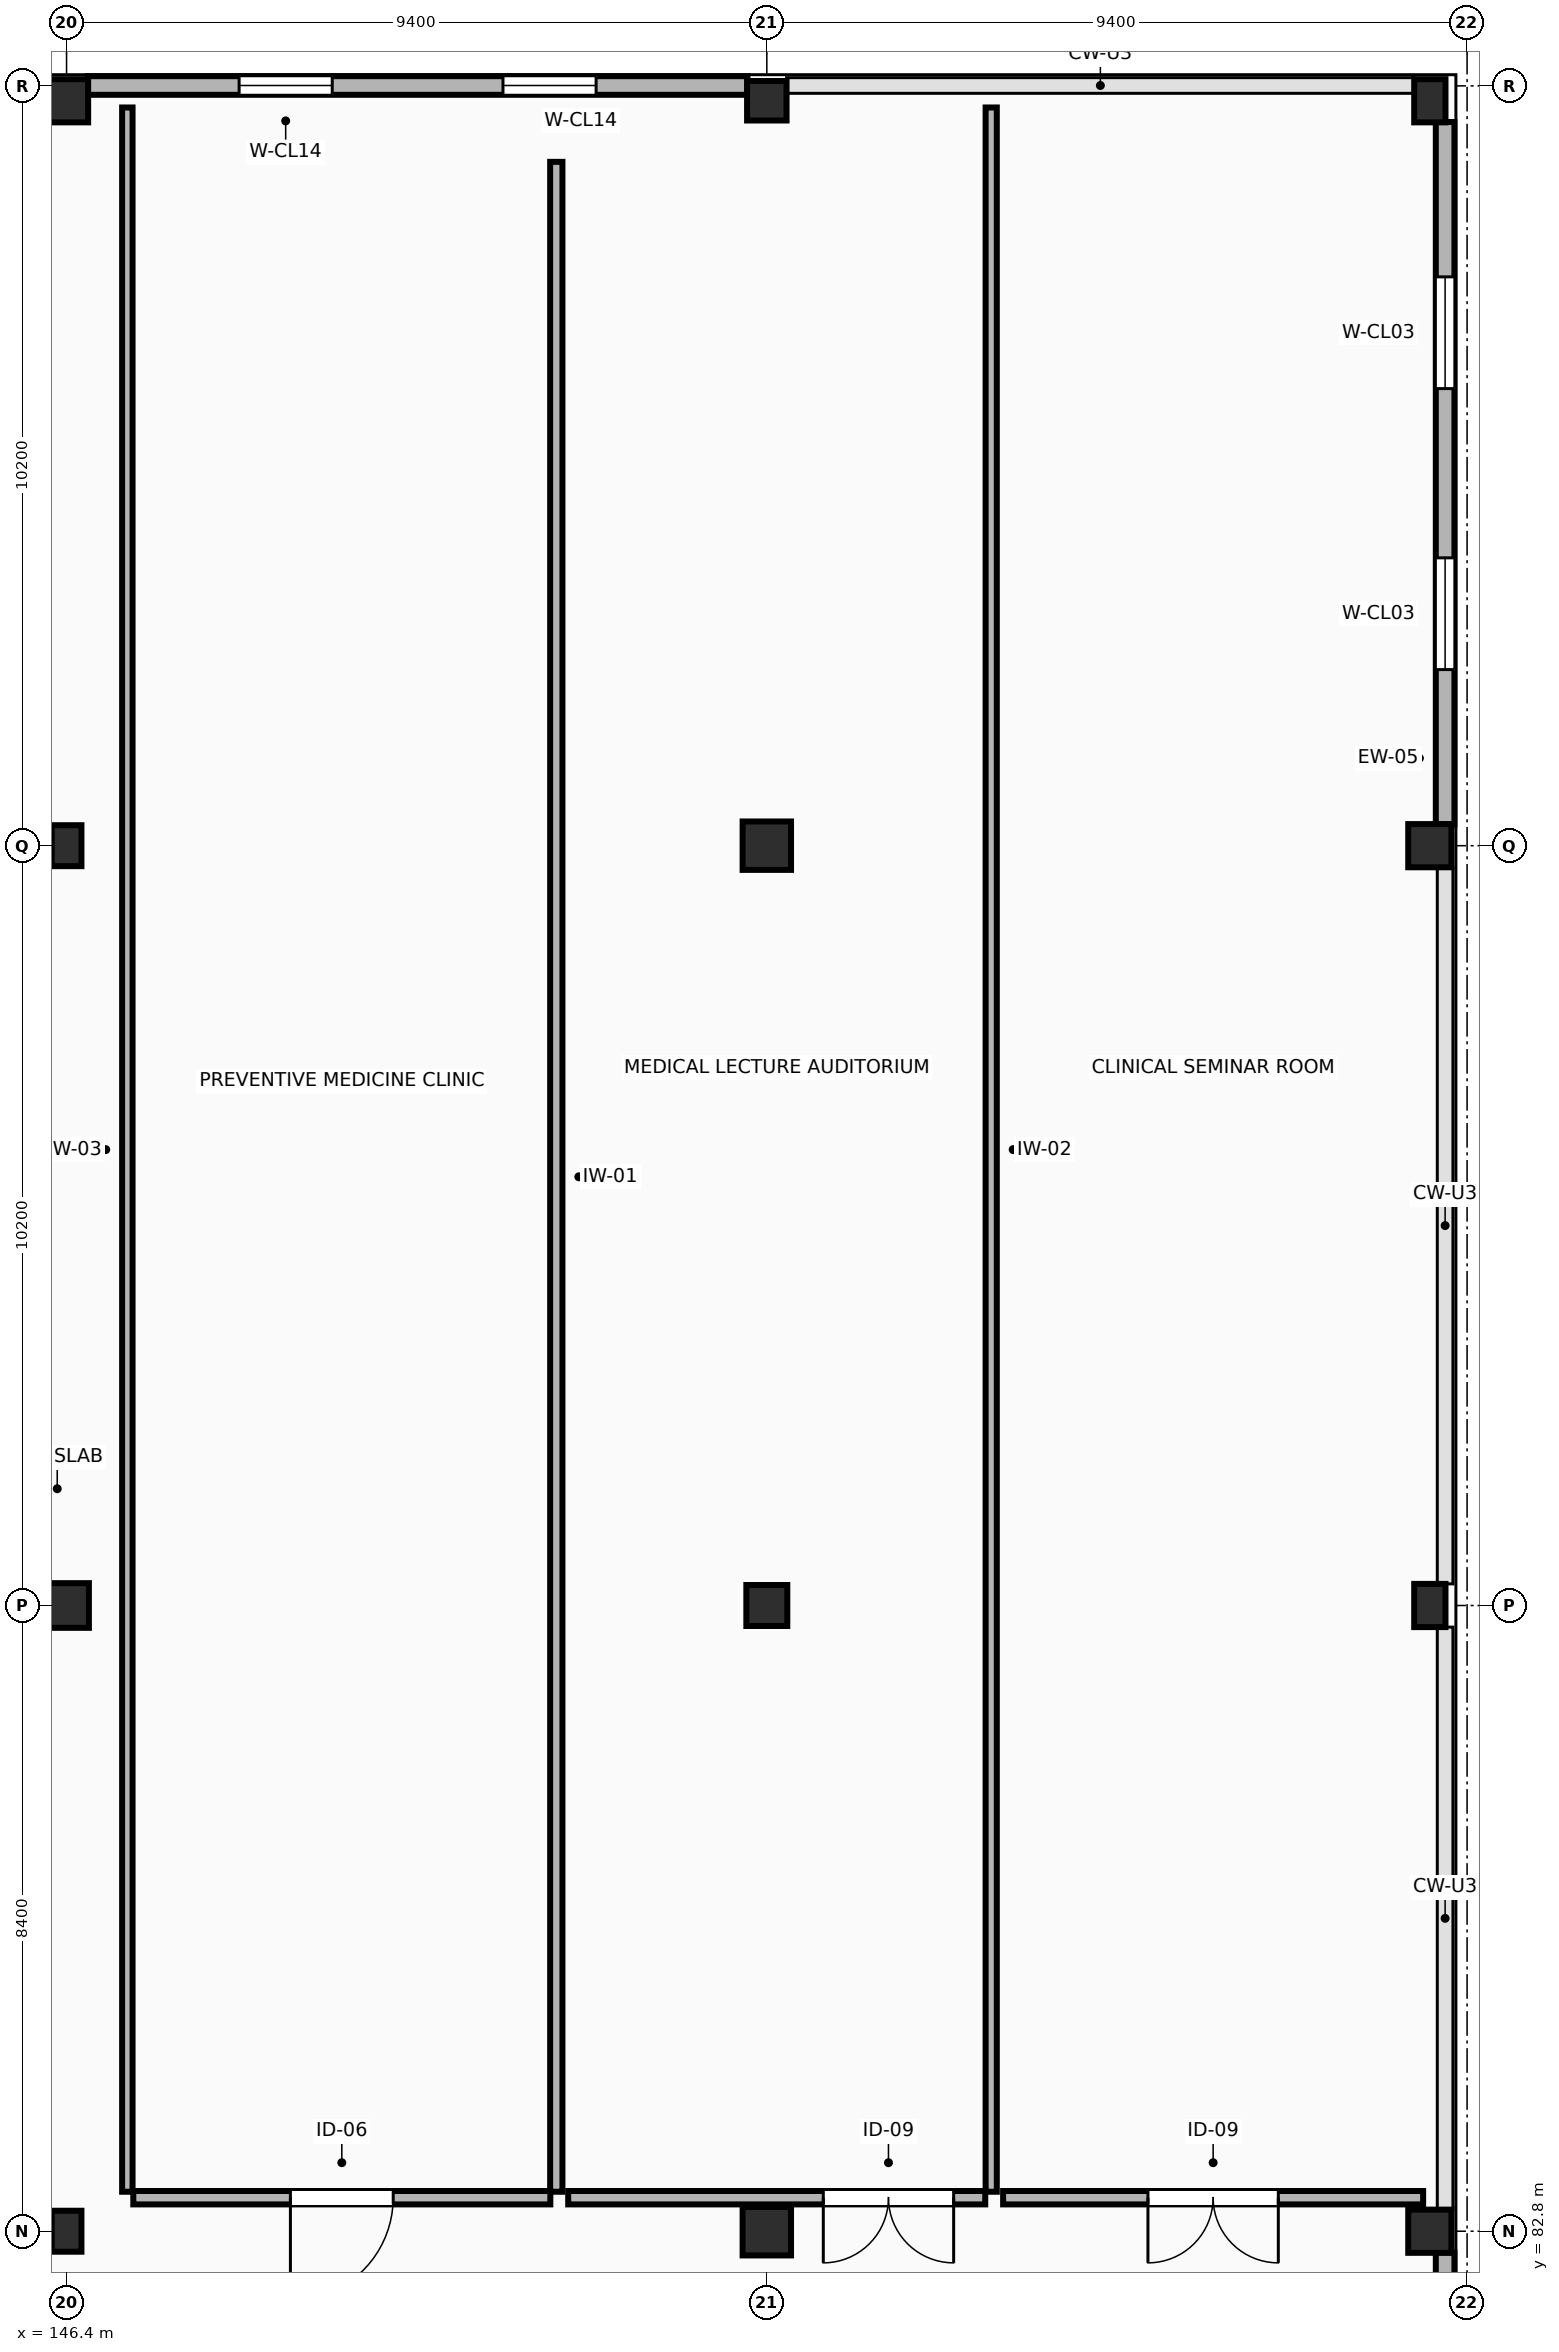
"""IFC4 building model, lengths in metres.
Left out: names, types, materials, properties, quantities, classifications, styles, units other than length and angle.
Written with IfcOpenShell. Run it as: python <this file> out.ifc"""

import sys

from ifc_helpers import new_model, si_unit, direction, frame, frame_2d, origin, origin_2d, place, context, subcontext, project, spatial, rectangle, extrude, element, fill, save


model = new_model("IFC4")
c1 = context("Model", 3, precision=1e-05, world=origin(), true_north=direction((0.0, 1.0)))
c2 = subcontext(c1, "Body", "Model", "MODEL_VIEW")
j1 = project(units=[si_unit("LENGTHUNIT", "METRE"), si_unit("PLANEANGLEUNIT", "RADIAN")], contexts=[c1])
p1 = place(None, origin())
s1 = spatial("IfcSite", under=j1, at=p1, CompositionType="ELEMENT")
p2 = place(p1, origin())
s2 = spatial("IfcBuilding", under=s1, at=p2, CompositionType="ELEMENT")
p3 = place(p2, origin())
s3 = spatial("IfcBuildingStorey", under=s2, at=p3, CompositionType="ELEMENT", Elevation=0.0)
p4 = place(p3, frame((146.4, 82.8, -1.75), z_axis=(0.0, 0.0, 1.0), x_axis=(1.0, 0.0, 0.0)))
e1 = element("IfcColumn", 1, at=p4, inside=s3, PredefinedType="COLUMN", context=c2, shape_type="SweptSolid", body=[
    extrude(rectangle(XDim=0.4, YDim=0.55, at=origin_2d()), origin(), (0.0, 0.0, 1.0), 7.15),
])
p5 = place(p3, frame((146.4, 91.2, -1.75), z_axis=(0.0, 0.0, 1.0), x_axis=(1.0, 0.0, 0.0)))
e2 = element("IfcColumn", 2, at=p5, inside=s3, PredefinedType="COLUMN", context=c2, shape_type="SweptSolid", body=[
    extrude(rectangle(XDim=0.6, YDim=0.6, at=origin_2d()), origin(), (0.0, 0.0, 1.0), 7.15),
])
p6 = place(p3, frame((146.4, 101.4, -1.75), z_axis=(0.0, 0.0, 1.0), x_axis=(1.0, 0.0, 0.0)))
e3 = element("IfcColumn", 3, at=p6, inside=s3, PredefinedType="COLUMN", context=c2, shape_type="SweptSolid", body=[
    extrude(rectangle(XDim=0.4, YDim=0.55, at=origin_2d()), origin(), (0.0, 0.0, 1.0), 7.15),
])
p7 = place(p3, frame((146.4, 111.4, -1.75), z_axis=(0.0, 0.0, 1.0), x_axis=(1.0, 0.0, 0.0)))
e4 = element("IfcColumn", 4, at=p7, inside=s3, PredefinedType="COLUMN", context=c2, shape_type="SweptSolid", body=[
    extrude(rectangle(XDim=0.58, YDim=0.58, at=origin_2d()), origin(), (0.0, 0.0, 1.0), 7.15),
])
p8 = place(p3, frame((155.8, 82.8, -1.75), z_axis=(0.0, 0.0, 1.0), x_axis=(1.0, 0.0, 0.0)))
e5 = element("IfcColumn", 5, at=p8, inside=s3, PredefinedType="COLUMN", context=c2, shape_type="SweptSolid", body=[
    extrude(rectangle(XDim=0.65, YDim=0.65, at=origin_2d()), origin(), (0.0, 0.0, 1.0), 7.15),
])
p9 = place(p3, frame((155.8, 91.2, -1.75), z_axis=(0.0, 0.0, 1.0), x_axis=(1.0, 0.0, 0.0)))
e6 = element("IfcColumn", 6, at=p9, inside=s3, PredefinedType="COLUMN", context=c2, shape_type="SweptSolid", body=[
    extrude(rectangle(XDim=0.55, YDim=0.55, at=origin_2d()), origin(), (0.0, 0.0, 1.0), 7.15),
])
p10 = place(p3, frame((155.8, 101.4, -1.75), z_axis=(0.0, 0.0, 1.0), x_axis=(1.0, 0.0, 0.0)))
e7 = element("IfcColumn", 7, at=p10, inside=s3, PredefinedType="COLUMN", context=c2, shape_type="SweptSolid", body=[
    extrude(rectangle(XDim=0.65, YDim=0.65, at=origin_2d()), origin(), (0.0, 0.0, 1.0), 7.15),
])
p11 = place(p3, frame((155.8, 111.4, -1.75), z_axis=(0.0, 0.0, 1.0), x_axis=(1.0, 0.0, 0.0)))
e8 = element("IfcColumn", 8, at=p11, inside=s3, PredefinedType="COLUMN", context=c2, shape_type="SweptSolid", body=[
    extrude(rectangle(XDim=0.53, YDim=0.53, at=origin_2d()), origin(), (0.0, 0.0, 1.0), 7.15),
])
p12 = place(p3, frame((164.7, 82.8, -1.75), z_axis=(0.0, 0.0, 1.0), x_axis=(1.0, 0.0, 0.0)))
e9 = element("IfcColumn", 9, at=p12, inside=s3, PredefinedType="COLUMN", context=c2, shape_type="SweptSolid", body=[
    extrude(rectangle(XDim=0.58, YDim=0.58, at=origin_2d()), origin(), (0.0, 0.0, 1.0), 7.15),
])
p13 = place(p3, frame((164.7, 91.2, -1.75), z_axis=(0.0, 0.0, 1.0), x_axis=(1.0, 0.0, 0.0)))
e10 = element("IfcColumn", 10, at=p13, inside=s3, PredefinedType="COLUMN", context=c2, shape_type="SweptSolid", body=[
    extrude(rectangle(XDim=0.42, YDim=0.58, at=origin_2d()), origin(), (0.0, 0.0, 1.0), 7.15),
])
p14 = place(p3, frame((164.7, 101.4, -1.75), z_axis=(0.0, 0.0, 1.0), x_axis=(1.0, 0.0, 0.0)))
e11 = element("IfcColumn", 11, at=p14, inside=s3, PredefinedType="COLUMN", context=c2, shape_type="SweptSolid", body=[
    extrude(rectangle(XDim=0.58, YDim=0.58, at=origin_2d()), origin(), (0.0, 0.0, 1.0), 7.15),
])
p15 = place(p3, frame((164.7, 111.4, -1.75), z_axis=(0.0, 0.0, 1.0), x_axis=(1.0, 0.0, 0.0)))
e12 = element("IfcColumn", 12, at=p15, inside=s3, PredefinedType="COLUMN", context=c2, shape_type="SweptSolid", body=[
    extrude(rectangle(XDim=0.42, YDim=0.58, at=origin_2d()), origin(), (0.0, 0.0, 1.0), 7.15),
])
p16 = place(p3, frame((164.905, 73.485, 0.0), z_axis=(0.0, 0.0, 1.0), x_axis=(0.0, 1.0, 0.0)))
e13 = element("IfcWall", 13, at=p16, inside=s3, PredefinedType="STANDARD", context=c2, shape_type="SweptSolid", body=[
    extrude(rectangle(XDim=9.03, YDim=0.25, at=frame_2d((4.515, 0.0))), origin(), (0.0, 0.0, 1.0), 4.47),
])
p17 = place(p16, frame((6.575, 0.0, 0.0)))
e14 = element("IfcOpeningElement", 14, at=p17, cuts=e13, PredefinedType="OPENING", context=c2, shape_type="SweptSolid", body=[
    extrude(rectangle(XDim=1.8, YDim=2.3, at=frame_2d((0.9, 1.15))), frame((0.0, 0.135, 0.0), z_axis=(0.0, -1.0, 0.0), x_axis=(1.0, 0.0, 0.0)), (0.0, 0.0, 1.0), 0.27),
])
p18 = place(p3, frame((164.905, 101.685, 0.0), z_axis=(0.0, 0.0, 1.0), x_axis=(0.0, 1.0, 0.0)))
e15 = element("IfcWall", 15, at=p18, inside=s3, PredefinedType="STANDARD", context=c2, shape_type="SweptSolid", body=[
    extrude(rectangle(XDim=9.43, YDim=0.25, at=frame_2d((4.715, 0.0))), origin(), (0.0, 0.0, 1.0), 4.47),
])
p19 = place(p18, frame((2.079, 0.0, 0.95)))
e16 = element("IfcOpeningElement", 16, at=p19, cuts=e15, PredefinedType="OPENING", context=c2, shape_type="SweptSolid", body=[
    extrude(rectangle(XDim=1.5, YDim=1.65, at=frame_2d((0.75, 0.825))), frame((0.0, 0.135, 0.0), z_axis=(0.0, -1.0, 0.0), x_axis=(1.0, 0.0, 0.0)), (0.0, 0.0, 1.0), 0.27),
])
p20 = place(p18, frame((5.851, 0.0, 0.95)))
e17 = element("IfcOpeningElement", 17, at=p20, cuts=e15, PredefinedType="OPENING", context=c2, shape_type="SweptSolid", body=[
    extrude(rectangle(XDim=1.5, YDim=1.65, at=frame_2d((0.75, 0.825))), frame((0.0, 0.135, 0.0), z_axis=(0.0, -1.0, 0.0), x_axis=(1.0, 0.0, 0.0)), (0.0, 0.0, 1.0), 0.27),
])
p21 = place(p3, frame((155.54, 111.605, 0.0), z_axis=(0.0, 0.0, 1.0), x_axis=(-1.0, 0.0, 0.0)))
e18 = element("IfcWall", 18, at=p21, inside=s3, PredefinedType="STANDARD", context=c2, shape_type="SweptSolid", body=[
    extrude(rectangle(XDim=8.855, YDim=0.25, at=frame_2d((4.427, 0.0))), origin(), (0.0, 0.0, 1.0), 4.42),
])
p22 = place(p21, frame((2.031, 0.0, 0.95)))
e19 = element("IfcOpeningElement", 19, at=p22, cuts=e18, PredefinedType="OPENING", context=c2, shape_type="SweptSolid", body=[
    extrude(rectangle(XDim=1.25, YDim=1.55, at=frame_2d((0.625, 0.775))), frame((0.0, 0.135, 0.0), z_axis=(0.0, -1.0, 0.0), x_axis=(1.0, 0.0, 0.0)), (0.0, 0.0, 1.0), 0.27),
])
p23 = place(p21, frame((5.573, 0.0, 0.95)))
e20 = element("IfcOpeningElement", 20, at=p23, cuts=e18, PredefinedType="OPENING", context=c2, shape_type="SweptSolid", body=[
    extrude(rectangle(XDim=1.25, YDim=1.55, at=frame_2d((0.625, 0.775))), frame((0.0, 0.135, 0.0), z_axis=(0.0, -1.0, 0.0), x_axis=(1.0, 0.0, 0.0)), (0.0, 0.0, 1.0), 0.27),
])
p24 = place(p3, frame((152.974, 110.58, 0.0), z_axis=(0.0, 0.0, 1.0), x_axis=(0.0, -1.0, 0.0)))
e21 = element("IfcWall", 21, at=p24, inside=s3, PredefinedType="PARTITIONING", context=c2, shape_type="SweptSolid", body=[
    extrude(rectangle(XDim=27.25, YDim=0.165, at=frame_2d((13.625, 0.0))), origin(), (0.0, 0.0, 1.0), 4.734),
])
p25 = place(p3, frame((152.894, 83.25, 0.0), z_axis=(0.0, 0.0, 1.0), x_axis=(-1.0, 0.0, 0.0)))
e22 = element("IfcWall", 22, at=p25, inside=s3, PredefinedType="PARTITIONING", context=c2, shape_type="SweptSolid", body=[
    extrude(rectangle(XDim=5.598, YDim=0.18, at=frame_2d((2.799, 0.0))), origin(), (0.0, 0.0, 1.0), 4.435),
])
p26 = place(p25, frame((2.109, 0.0, 0.0)))
e23 = element("IfcOpeningElement", 23, at=p26, cuts=e22, PredefinedType="OPENING", context=c2, shape_type="SweptSolid", body=[
    extrude(rectangle(XDim=1.38, YDim=2.25, at=frame_2d((0.69, 1.125))), frame((0.0, 0.1, 0.0), z_axis=(0.0, -1.0, 0.0), x_axis=(1.0, 0.0, 0.0)), (0.0, 0.0, 1.0), 0.2),
])
p27 = place(p3, frame((147.216, 83.33, 0.0), z_axis=(0.0, 0.0, 1.0), x_axis=(0.0, 1.0, 0.0)))
e24 = element("IfcWall", 24, at=p27, inside=s3, PredefinedType="PARTITIONING", context=c2, shape_type="SweptSolid", body=[
    extrude(rectangle(XDim=27.98, YDim=0.14, at=frame_2d((13.99, 0.0))), origin(), (0.0, 0.0, 1.0), 5.1),
])
p28 = place(p3, frame((158.812, 111.31, 0.0), z_axis=(0.0, 0.0, 1.0), x_axis=(0.0, -1.0, 0.0)))
e25 = element("IfcWall", 25, at=p28, inside=s3, PredefinedType="PARTITIONING", context=c2, shape_type="SweptSolid", body=[
    extrude(rectangle(XDim=27.98, YDim=0.15, at=frame_2d((13.99, 0.0))), origin(), (0.0, 0.0, 1.0), 4.804),
])
p29 = place(p3, frame((158.732, 83.25, 0.0), z_axis=(0.0, 0.0, 1.0), x_axis=(-1.0, 0.0, 0.0)))
e26 = element("IfcWall", 26, at=p29, inside=s3, PredefinedType="PARTITIONING", context=c2, shape_type="SweptSolid", body=[
    extrude(rectangle(XDim=5.598, YDim=0.18, at=frame_2d((2.799, 0.0))), origin(), (0.0, 0.0, 1.0), 4.435),
])
p30 = place(p29, frame((0.424, 0.0, 0.0)))
e27 = element("IfcOpeningElement", 27, at=p30, cuts=e26, PredefinedType="OPENING", context=c2, shape_type="SweptSolid", body=[
    extrude(rectangle(XDim=1.75, YDim=2.35, at=frame_2d((0.875, 1.175))), frame((0.0, 0.1, 0.0), z_axis=(0.0, -1.0, 0.0), x_axis=(1.0, 0.0, 0.0)), (0.0, 0.0, 1.0), 0.2),
])
p31 = place(p3, frame((164.61, 83.25, 0.0), z_axis=(0.0, 0.0, 1.0), x_axis=(-1.0, 0.0, 0.0)))
e28 = element("IfcWall", 28, at=p31, inside=s3, PredefinedType="PARTITIONING", context=c2, shape_type="SweptSolid", body=[
    extrude(rectangle(XDim=5.638, YDim=0.18, at=frame_2d((2.819, 0.0))), origin(), (0.0, 0.0, 1.0), 4.46),
])
p32 = place(p31, frame((1.944, 0.0, 0.0)))
e29 = element("IfcOpeningElement", 29, at=p32, cuts=e28, PredefinedType="OPENING", context=c2, shape_type="SweptSolid", body=[
    extrude(rectangle(XDim=1.75, YDim=2.35, at=frame_2d((0.875, 1.175))), frame((0.0, 0.1, 0.0), z_axis=(0.0, -1.0, 0.0), x_axis=(1.0, 0.0, 0.0)), (0.0, 0.0, 1.0), 0.2),
])
p33 = place(p19, origin())
e30 = element("IfcWindow", 30, at=p33, inside=s3, PartitioningType="SINGLE_PANEL", PredefinedType="WINDOW", context=c2, shape_type="SweptSolid", body=[
    extrude(rectangle(XDim=1.5, YDim=1.65, at=frame_2d((0.75, 0.825))), frame((0.0, 0.03, 0.0), z_axis=(0.0, -1.0, 0.0), x_axis=(1.0, 0.0, 0.0)), (0.0, 0.0, 1.0), 0.06),
])
fill(e16, e30)
p34 = place(p20, origin())
e31 = element("IfcWindow", 31, at=p34, inside=s3, PartitioningType="SINGLE_PANEL", PredefinedType="WINDOW", context=c2, shape_type="SweptSolid", body=[
    extrude(rectangle(XDim=1.5, YDim=1.65, at=frame_2d((0.75, 0.825))), frame((0.0, 0.03, 0.0), z_axis=(0.0, -1.0, 0.0), x_axis=(1.0, 0.0, 0.0)), (0.0, 0.0, 1.0), 0.06),
])
fill(e17, e31)
p35 = place(p22, origin())
e32 = element("IfcWindow", 32, at=p35, inside=s3, PartitioningType="SINGLE_PANEL", PredefinedType="WINDOW", context=c2, shape_type="SweptSolid", body=[
    extrude(rectangle(XDim=1.25, YDim=1.55, at=frame_2d((0.625, 0.775))), frame((0.0, 0.03, 0.0), z_axis=(0.0, -1.0, 0.0), x_axis=(1.0, 0.0, 0.0)), (0.0, 0.0, 1.0), 0.06),
])
fill(e19, e32)
p36 = place(p23, origin())
e33 = element("IfcWindow", 33, at=p36, inside=s3, PartitioningType="SINGLE_PANEL", PredefinedType="WINDOW", context=c2, shape_type="SweptSolid", body=[
    extrude(rectangle(XDim=1.25, YDim=1.55, at=frame_2d((0.625, 0.775))), frame((0.0, 0.03, 0.0), z_axis=(0.0, -1.0, 0.0), x_axis=(1.0, 0.0, 0.0)), (0.0, 0.0, 1.0), 0.06),
])
fill(e20, e33)
p37 = place(p26, origin())
e34 = element("IfcDoor", 34, at=p37, inside=s3, OperationType="SINGLE_SWING_RIGHT", PredefinedType="DOOR", context=c2, shape_type="SweptSolid", body=[
    extrude(rectangle(XDim=1.38, YDim=2.25, at=frame_2d((0.69, 1.125))), frame((0.0, 0.025, 0.0), z_axis=(0.0, -1.0, 0.0), x_axis=(1.0, 0.0, 0.0)), (0.0, 0.0, 1.0), 0.05),
])
fill(e23, e34)
p38 = place(p30, origin())
e35 = element("IfcDoor", 35, at=p38, inside=s3, OperationType="DOUBLE_DOOR_SINGLE_SWING", PredefinedType="DOOR", context=c2, shape_type="SweptSolid", body=[
    extrude(rectangle(XDim=1.75, YDim=2.35, at=frame_2d((0.875, 1.175))), frame((0.0, 0.025, 0.0), z_axis=(0.0, -1.0, 0.0), x_axis=(1.0, 0.0, 0.0)), (0.0, 0.0, 1.0), 0.05),
])
fill(e27, e35)
p39 = place(p32, origin())
e36 = element("IfcDoor", 36, at=p39, inside=s3, OperationType="DOUBLE_DOOR_SINGLE_SWING", PredefinedType="DOOR", context=c2, shape_type="SweptSolid", body=[
    extrude(rectangle(XDim=1.75, YDim=2.35, at=frame_2d((0.875, 1.175))), frame((0.0, 0.025, 0.0), z_axis=(0.0, -1.0, 0.0), x_axis=(1.0, 0.0, 0.0)), (0.0, 0.0, 1.0), 0.05),
])
fill(e29, e36)
save(model, sys.argv[1])
